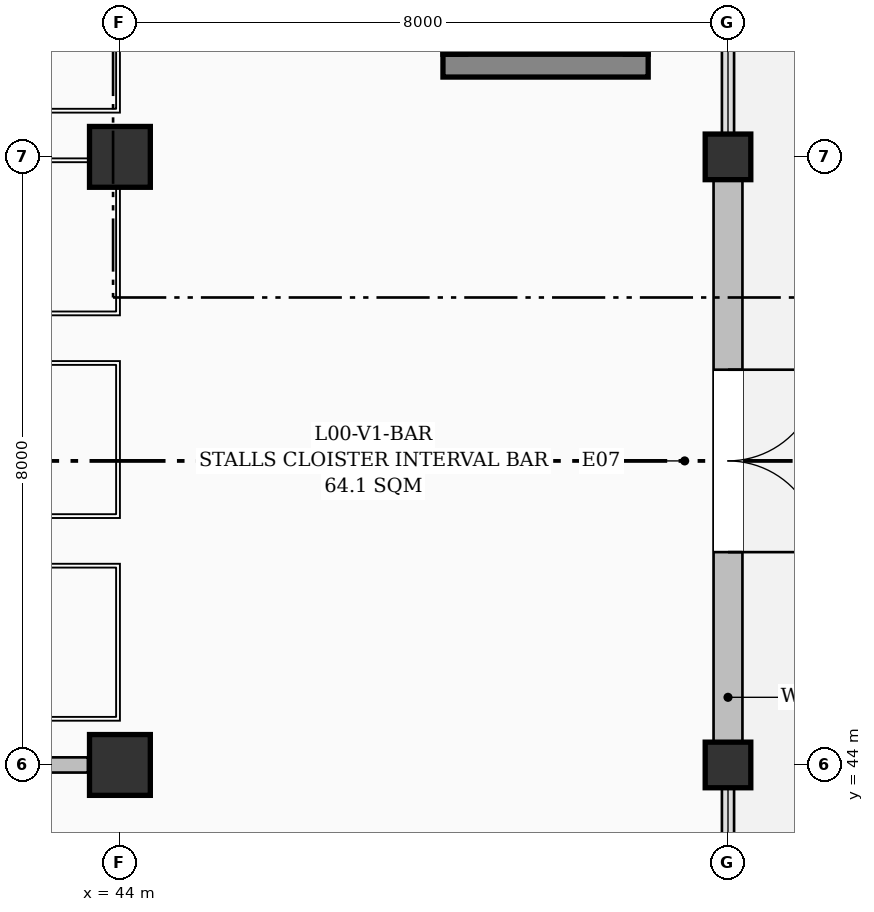
"""IFC4 building model, lengths in metres.
Left out: names, types, materials, properties, quantities, classifications, styles, units other than length and angle.
Written with IfcOpenShell. Run it as: python <this file> out.ifc"""

import sys

from ifc_helpers import new_model, si_unit, direction, frame, frame_2d, origin, origin_2d, place, context, subcontext, project, spatial, rectangle, extrude, element, fill, save


model = new_model("IFC4")
c1 = context("Model", 3, precision=1e-05, world=origin(), true_north=direction((0.0, 1.0)))
c2 = subcontext(c1, "Body", "Model", "MODEL_VIEW")
j1 = project(units=[si_unit("LENGTHUNIT", "METRE"), si_unit("PLANEANGLEUNIT", "RADIAN")], contexts=[c1])
p1 = place(None, origin())
s1 = spatial("IfcSite", under=j1, at=p1, CompositionType="ELEMENT")
p2 = place(p1, origin())
s2 = spatial("IfcBuilding", under=s1, at=p2, CompositionType="ELEMENT")
p3 = place(p2, origin())
s3 = spatial("IfcBuildingStorey", under=s2, at=p3, CompositionType="ELEMENT", Elevation=0.0)
for number, where, z_axis, x_axis in (
    (1, (44.0, 44.0, 0.0), (0.0, 0.0, 1.0), (1.0, 0.0, 0.0)),
    (2, (44.0, 52.0, 0.0), (0.0, 0.0, 1.0), (1.0, 0.0, 0.0)),
):
    element("IfcColumn", number, at=place(p3, frame(where, z_axis=z_axis, x_axis=x_axis)), inside=s3, PredefinedType="COLUMN", context=c2, shape_type="SweptSolid", body=[
        extrude(rectangle(XDim=0.8, YDim=0.8, at=origin_2d()), origin(), (0.0, 0.0, 1.0), 4.8),
    ])
for number, where, z_axis, x_axis in (
    (3, (52.0, 44.0, 0.0), (0.0, 0.0, 1.0), (1.0, 0.0, 0.0)),
    (4, (52.0, 52.0, 0.0), (0.0, 0.0, 1.0), (1.0, 0.0, 0.0)),
):
    element("IfcColumn", number, at=place(p3, frame(where, z_axis=z_axis, x_axis=x_axis)), inside=s3, PredefinedType="COLUMN", context=c2, shape_type="SweptSolid", body=[
        extrude(rectangle(XDim=0.6, YDim=0.6, at=origin_2d()), origin(), (0.0, 0.0, 1.0), 4.8),
    ])
p4 = place(p3, frame((52.0, 51.7, 0.0), z_axis=(0.0, 0.0, 1.0), x_axis=(0.0, -1.0, 0.0)))
e5 = element("IfcWall", 5, at=p4, inside=s3, PredefinedType="SOLIDWALL", context=c2, shape_type="SweptSolid", body=[
    extrude(rectangle(XDim=7.4, YDim=0.38, at=frame_2d((3.7, 0.0))), origin(), (0.0, 0.0, 1.0), 3.985),
])
p5 = place(p4, frame((2.5, 0.0, 0.0)))
e6 = element("IfcOpeningElement", 6, at=p5, cuts=e5, PredefinedType="OPENING", context=c2, shape_type="SweptSolid", body=[
    extrude(rectangle(XDim=2.4, YDim=2.4, at=frame_2d((1.2, 1.2))), frame((0.0, 0.2, 0.0), z_axis=(0.0, -1.0, 0.0), x_axis=(1.0, 0.0, 0.0)), (0.0, 0.0, 1.0), 0.4),
])
p6 = place(p3, frame((48.25, 53.2, 0.0), z_axis=(0.0, 0.0, 1.0), x_axis=(1.0, 0.0, 0.0)))
e7 = element("IfcWall", 7, at=p6, inside=s3, PredefinedType="SHEAR", context=c2, shape_type="SweptSolid", body=[
    extrude(rectangle(XDim=2.7, YDim=0.3, at=frame_2d((1.35, 0.0))), origin(), (0.0, 0.0, 1.0), 4.55),
])
p7 = place(p3, frame((48.4, 53.35, 0.0), z_axis=(0.0, 0.0, 1.0), x_axis=(0.0, 1.0, 0.0)))
e8 = element("IfcWall", 8, at=p7, inside=s3, PredefinedType="SHEAR", context=c2, shape_type="SweptSolid", body=[
    extrude(rectangle(XDim=2.6, YDim=0.3, at=frame_2d((1.3, 0.0))), origin(), (0.0, 0.0, 1.0), 4.55),
])
p8 = place(p7, frame((0.75, 0.0, 0.0)))
e9 = element("IfcOpeningElement", 9, at=p8, cuts=e8, PredefinedType="OPENING", context=c2, shape_type="SweptSolid", body=[
    extrude(rectangle(XDim=1.1, YDim=2.15, at=frame_2d((0.55, 1.075))), frame((0.0, 0.16, 0.0), z_axis=(0.0, -1.0, 0.0), x_axis=(1.0, 0.0, 0.0)), (0.0, 0.0, 1.0), 0.32),
])
p9 = place(p3, frame((50.8, 55.95, 0.0), z_axis=(0.0, 0.0, 1.0), x_axis=(0.0, -1.0, 0.0)))
e10 = element("IfcWall", 10, at=p9, inside=s3, PredefinedType="SHEAR", context=c2, shape_type="SweptSolid", body=[
    extrude(rectangle(XDim=2.6, YDim=0.3, at=frame_2d((1.3, 0.0))), origin(), (0.0, 0.0, 1.0), 4.55),
])
p10 = place(p3, frame((12.42, 44.0, 0.0), z_axis=(0.0, 0.0, 1.0), x_axis=(1.0, 0.0, 0.0)))
e11 = element("IfcWall", 11, at=p10, inside=s3, PredefinedType="PARTITIONING", context=c2, shape_type="SweptSolid", body=[
    extrude(rectangle(XDim=31.16, YDim=0.2, at=frame_2d((15.58, 0.0))), origin(), (0.0, 0.0, 1.0), 3.685),
])
p11 = place(p10, frame((10.941, 0.0, 0.0)))
e12 = element("IfcOpeningElement", 12, at=p11, cuts=e11, PredefinedType="OPENING", context=c2, shape_type="SweptSolid", body=[
    extrude(rectangle(XDim=1.8, YDim=2.35, at=frame_2d((0.9, 1.175))), frame((0.0, 0.11, 0.0), z_axis=(0.0, -1.0, 0.0), x_axis=(1.0, 0.0, 0.0)), (0.0, 0.0, 1.0), 0.22),
])
p12 = place(p5, origin())
e13 = element("IfcDoor", 13, at=p12, inside=s3, OperationType="DOUBLE_DOOR_SINGLE_SWING", PredefinedType="DOOR", context=c2, shape_type="SweptSolid", body=[
    extrude(rectangle(XDim=2.4, YDim=2.4, at=frame_2d((1.2, 1.2))), frame((0.0, 0.025, 0.0), z_axis=(0.0, -1.0, 0.0), x_axis=(1.0, 0.0, 0.0)), (0.0, 0.0, 1.0), 0.05),
])
fill(e6, e13)
save(model, sys.argv[1])
